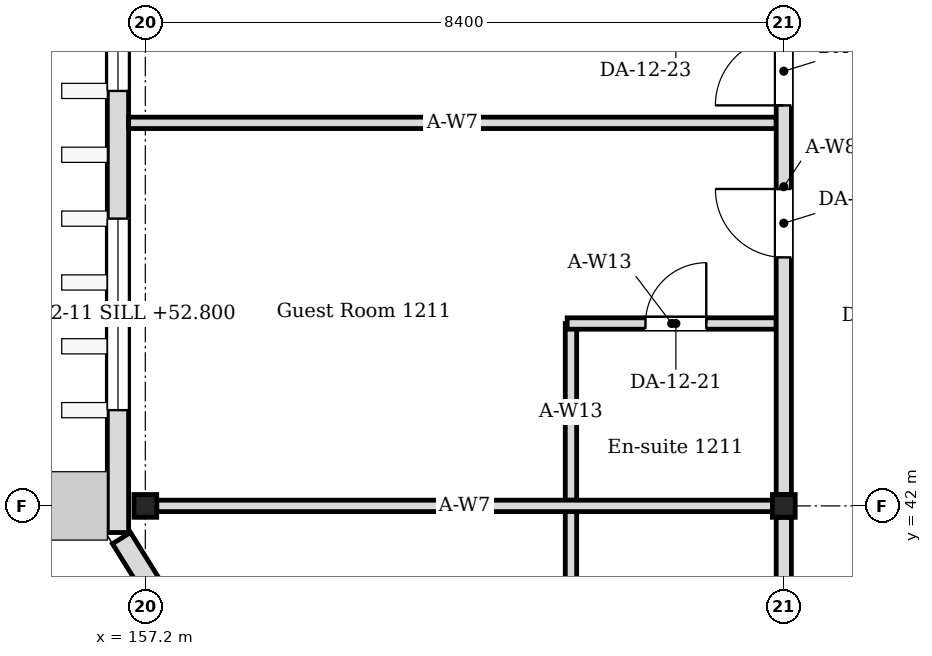
"""IFC4 building model, lengths in metres.
Left out: names, types, materials, properties, quantities, classifications, styles, units other than length and angle.
Written with IfcOpenShell. Run it as: python <this file> out.ifc"""

import sys

from ifc_helpers import new_model, si_unit, direction, frame, frame_2d, origin, origin_2d, place, context, subcontext, project, spatial, rectangle, i_section, extrude, element, fill, save


model = new_model("IFC4")
c1 = context("Model", 3, precision=1e-05, world=origin(), true_north=direction((0.0, 1.0)))
c2 = subcontext(c1, "Body", "Model", "MODEL_VIEW")
j1 = project(units=[si_unit("LENGTHUNIT", "METRE"), si_unit("PLANEANGLEUNIT", "RADIAN")], contexts=[c1])
p1 = place(None, origin())
s1 = spatial("IfcSite", under=j1, at=p1, CompositionType="ELEMENT")
p2 = place(p1, origin())
s2 = spatial("IfcBuilding", under=s1, at=p2, CompositionType="ELEMENT")
p3 = place(p2, frame((0.0, 0.0, 52.2)))
s3 = spatial("IfcBuildingStorey", under=s2, at=p3, CompositionType="ELEMENT", Elevation=52.2)
for number, where, z_axis, x_axis in (
    (1, (157.2, 42.0, 0.0), (0.0, 0.0, 1.0), (1.0, 0.0, 0.0)),
    (2, (165.6, 42.0, 0.0), (0.0, 0.0, 1.0), (1.0, 0.0, 0.0)),
):
    element("IfcColumn", number, at=place(p3, frame(where, z_axis=z_axis, x_axis=x_axis)), inside=s3, PredefinedType="COLUMN", context=c2, shape_type="SweptSolid", body=[
        extrude(i_section(OverallWidth=0.3, OverallDepth=0.3, WebThickness=0.01, FlangeThickness=0.015, FilletRadius=0.013, at=origin_2d()), origin(), (0.0, 0.0, 1.0), 4.2),
    ])
p4 = place(p3, frame((159.079, 38.059, 0.0), z_axis=(0.0, 0.0, 1.0), x_axis=(-0.529018946142, 0.848610013271, 0.0)))
e3 = element("IfcWall", 3, at=p4, inside=s3, PredefinedType="SOLIDWALL", context=c2, shape_type="SweptSolid", body=[
    extrude(rectangle(XDim=4.144, YDim=0.28, at=frame_2d((2.072, 0.0))), origin(), (0.0, 0.0, 1.0), 4.05),
])
p5 = place(p4, frame((0.812, 0.0, 0.6)))
e4 = element("IfcOpeningElement", 4, at=p5, cuts=e3, PredefinedType="OPENING", context=c2, shape_type="SweptSolid", body=[
    extrude(rectangle(XDim=2.52, YDim=2.4, at=frame_2d((1.26, 1.2))), frame((0.0, 0.15, 0.0), z_axis=(0.0, -1.0, 0.0), x_axis=(1.0, 0.0, 0.0)), (0.0, 0.0, 1.0), 0.3),
])
p6 = place(p3, frame((156.84, 41.65, 0.0), z_axis=(0.0, 0.0, 1.0), x_axis=(0.0, 1.0, 0.0)))
e5 = element("IfcWall", 5, at=p6, inside=s3, PredefinedType="SOLIDWALL", context=c2, shape_type="SweptSolid", body=[
    extrude(rectangle(XDim=25.77, YDim=0.28, at=frame_2d((12.885, 0.0))), origin(), (0.0, 0.0, 1.0), 4.05),
])
p7 = place(p6, frame((1.61, 0.0, 0.6)))
e6 = element("IfcOpeningElement", 6, at=p7, cuts=e5, PredefinedType="OPENING", context=c2, shape_type="SweptSolid", body=[
    extrude(rectangle(XDim=2.52, YDim=2.4, at=frame_2d((1.26, 1.2))), frame((0.0, 0.15, 0.0), z_axis=(0.0, -1.0, 0.0), x_axis=(1.0, 0.0, 0.0)), (0.0, 0.0, 1.0), 0.3),
])
p8 = place(p6, frame((5.81, 0.0, 0.6)))
e7 = element("IfcOpeningElement", 7, at=p8, cuts=e5, PredefinedType="OPENING", context=c2, shape_type="SweptSolid", body=[
    extrude(rectangle(XDim=2.52, YDim=2.4, at=frame_2d((1.26, 1.2))), frame((0.0, 0.15, 0.0), z_axis=(0.0, -1.0, 0.0), x_axis=(1.0, 0.0, 0.0)), (0.0, 0.0, 1.0), 0.3),
])
p9 = place(p6, frame((9.59, 0.0, 0.6)))
e8 = element("IfcOpeningElement", 8, at=p9, cuts=e5, PredefinedType="OPENING", context=c2, shape_type="SweptSolid", body=[
    extrude(rectangle(XDim=2.52, YDim=2.4, at=frame_2d((1.26, 1.2))), frame((0.0, 0.15, 0.0), z_axis=(0.0, -1.0, 0.0), x_axis=(1.0, 0.0, 0.0)), (0.0, 0.0, 1.0), 0.3),
])
p10 = place(p6, frame((13.79, 0.0, 0.6)))
e9 = element("IfcOpeningElement", 9, at=p10, cuts=e5, PredefinedType="OPENING", context=c2, shape_type="SweptSolid", body=[
    extrude(rectangle(XDim=2.52, YDim=2.4, at=frame_2d((1.26, 1.2))), frame((0.0, 0.15, 0.0), z_axis=(0.0, -1.0, 0.0), x_axis=(1.0, 0.0, 0.0)), (0.0, 0.0, 1.0), 0.3),
])
p11 = place(p6, frame((18.41, 0.0, 0.6)))
e10 = element("IfcOpeningElement", 10, at=p11, cuts=e5, PredefinedType="OPENING", context=c2, shape_type="SweptSolid", body=[
    extrude(rectangle(XDim=2.52, YDim=2.4, at=frame_2d((1.26, 1.2))), frame((0.0, 0.15, 0.0), z_axis=(0.0, -1.0, 0.0), x_axis=(1.0, 0.0, 0.0)), (0.0, 0.0, 1.0), 0.3),
])
p12 = place(p6, frame((22.61, 0.0, 0.6)))
e11 = element("IfcOpeningElement", 11, at=p12, cuts=e5, PredefinedType="OPENING", context=c2, shape_type="SweptSolid", body=[
    extrude(rectangle(XDim=2.52, YDim=2.4, at=frame_2d((1.26, 1.2))), frame((0.0, 0.15, 0.0), z_axis=(0.0, -1.0, 0.0), x_axis=(1.0, 0.0, 0.0)), (0.0, 0.0, 1.0), 0.3),
])
for number, where, z_axis, x_axis in (
    (12, (162.8, 39.6, 0.0), (0.0, 0.0, 1.0), (0.0, 1.0, 0.0)),
    (13, (162.8, 42.075, 0.0), (0.0, 0.0, 1.0), (0.0, 1.0, 0.0)),
):
    element("IfcWall", number, at=place(p3, frame(where, z_axis=z_axis, x_axis=x_axis)), inside=s3, PredefinedType="PARTITIONING", context=c2, shape_type="SweptSolid", body=[
        extrude(rectangle(XDim=2.325, YDim=0.15, at=frame_2d((1.163, 0.0))), origin(), (0.0, 0.0, 1.0), 4.05),
    ])
p13 = place(p3, frame((162.75, 44.4, 0.0), z_axis=(0.0, 0.0, 1.0), x_axis=(1.0, 0.0, 0.0)))
e14 = element("IfcWall", 14, at=p13, inside=s3, PredefinedType="PARTITIONING", context=c2, shape_type="SweptSolid", body=[
    extrude(rectangle(XDim=2.75, YDim=0.15, at=frame_2d((1.375, 0.0))), origin(), (0.0, 0.0, 1.0), 4.05),
])
p14 = place(p13, frame((1.03, 0.0, 0.0)))
e15 = element("IfcOpeningElement", 15, at=p14, cuts=e14, PredefinedType="OPENING", context=c2, shape_type="SweptSolid", body=[
    extrude(rectangle(XDim=0.8, YDim=2.1, at=frame_2d((0.4, 1.05))), frame((0.0, 0.085, 0.0), z_axis=(0.0, -1.0, 0.0), x_axis=(1.0, 0.0, 0.0)), (0.0, 0.0, 1.0), 0.17),
])
p15 = place(p3, frame((157.35, 42.0, 0.0), z_axis=(0.0, 0.0, 1.0), x_axis=(1.0, 0.0, 0.0)))
e16 = element("IfcWall", 16, at=p15, inside=s3, PredefinedType="PARTITIONING", context=c2, shape_type="SweptSolid", body=[
    extrude(rectangle(XDim=8.1, YDim=0.15, at=frame_2d((4.05, 0.0))), origin(), (0.0, 0.0, 1.0), 3.604),
])
p16 = place(p3, frame((156.98, 47.04, 0.0), z_axis=(0.0, 0.0, 1.0), x_axis=(1.0, 0.0, 0.0)))
e17 = element("IfcWall", 17, at=p16, inside=s3, PredefinedType="PARTITIONING", context=c2, shape_type="SweptSolid", body=[
    extrude(rectangle(XDim=8.52, YDim=0.15, at=frame_2d((4.26, 0.0))), origin(), (0.0, 0.0, 1.0), 3.604),
])
p17 = place(p3, frame((165.6, 33.75, 0.0), z_axis=(0.0, 0.0, 1.0), x_axis=(0.0, 1.0, 0.0)))
e18 = element("IfcWall", 18, at=p17, inside=s3, PredefinedType="PARTITIONING", context=c2, shape_type="SweptSolid", body=[
    extrude(rectangle(XDim=8.1, YDim=0.2, at=frame_2d((4.05, 0.0))), origin(), (0.0, 0.0, 1.0), 3.45),
])
p18 = place(p17, frame((2.7, 0.0, 0.0)))
e19 = element("IfcOpeningElement", 19, at=p18, cuts=e18, PredefinedType="OPENING", context=c2, shape_type="SweptSolid", body=[
    extrude(rectangle(XDim=0.9, YDim=2.1, at=frame_2d((0.45, 1.05))), frame((0.0, 0.11, 0.0), z_axis=(0.0, -1.0, 0.0), x_axis=(1.0, 0.0, 0.0)), (0.0, 0.0, 1.0), 0.22),
])
p19 = place(p17, frame((4.5, 0.0, 0.0)))
e20 = element("IfcOpeningElement", 20, at=p19, cuts=e18, PredefinedType="OPENING", context=c2, shape_type="SweptSolid", body=[
    extrude(rectangle(XDim=0.9, YDim=2.1, at=frame_2d((0.45, 1.05))), frame((0.0, 0.11, 0.0), z_axis=(0.0, -1.0, 0.0), x_axis=(1.0, 0.0, 0.0)), (0.0, 0.0, 1.0), 0.22),
])
p20 = place(p3, frame((165.6, 42.15, 0.0), z_axis=(0.0, 0.0, 1.0), x_axis=(0.0, 1.0, 0.0)))
e21 = element("IfcWall", 21, at=p20, inside=s3, PredefinedType="PARTITIONING", context=c2, shape_type="SweptSolid", body=[
    extrude(rectangle(XDim=8.1, YDim=0.2, at=frame_2d((4.05, 0.0))), origin(), (0.0, 0.0, 1.0), 3.45),
])
p21 = place(p20, frame((3.12, 0.0, 0.0)))
e22 = element("IfcOpeningElement", 22, at=p21, cuts=e21, PredefinedType="OPENING", context=c2, shape_type="SweptSolid", body=[
    extrude(rectangle(XDim=0.9, YDim=2.1, at=frame_2d((0.45, 1.05))), frame((0.0, 0.11, 0.0), z_axis=(0.0, -1.0, 0.0), x_axis=(1.0, 0.0, 0.0)), (0.0, 0.0, 1.0), 0.22),
])
p22 = place(p20, frame((5.12, 0.0, 0.0)))
e23 = element("IfcOpeningElement", 23, at=p22, cuts=e21, PredefinedType="OPENING", context=c2, shape_type="SweptSolid", body=[
    extrude(rectangle(XDim=0.9, YDim=2.1, at=frame_2d((0.45, 1.05))), frame((0.0, 0.11, 0.0), z_axis=(0.0, -1.0, 0.0), x_axis=(1.0, 0.0, 0.0)), (0.0, 0.0, 1.0), 0.22),
])
p23 = place(p7, origin())
e24 = element("IfcWindow", 24, at=p23, inside=s3, PartitioningType="SINGLE_PANEL", PredefinedType="WINDOW", context=c2, shape_type="SweptSolid", body=[
    extrude(rectangle(XDim=2.52, YDim=2.4, at=frame_2d((1.26, 1.2))), frame((0.0, 0.03, 0.0), z_axis=(0.0, -1.0, 0.0), x_axis=(1.0, 0.0, 0.0)), (0.0, 0.0, 1.0), 0.06),
])
fill(e6, e24)
p24 = place(p8, origin())
e25 = element("IfcWindow", 25, at=p24, inside=s3, PartitioningType="SINGLE_PANEL", PredefinedType="WINDOW", context=c2, shape_type="SweptSolid", body=[
    extrude(rectangle(XDim=2.52, YDim=2.4, at=frame_2d((1.26, 1.2))), frame((0.0, 0.03, 0.0), z_axis=(0.0, -1.0, 0.0), x_axis=(1.0, 0.0, 0.0)), (0.0, 0.0, 1.0), 0.06),
])
fill(e7, e25)
p25 = place(p14, origin())
e26 = element("IfcDoor", 26, at=p25, inside=s3, OperationType="SINGLE_SWING_RIGHT", PredefinedType="DOOR", context=c2, shape_type="SweptSolid", body=[
    extrude(rectangle(XDim=0.8, YDim=2.1, at=frame_2d((0.4, 1.05))), frame((0.0, 0.025, 0.0), z_axis=(0.0, -1.0, 0.0), x_axis=(1.0, 0.0, 0.0)), (0.0, 0.0, 1.0), 0.05),
])
fill(e15, e26)
p26 = place(p21, origin())
e27 = element("IfcDoor", 27, at=p26, inside=s3, OperationType="SINGLE_SWING_RIGHT", PredefinedType="DOOR", context=c2, shape_type="SweptSolid", body=[
    extrude(rectangle(XDim=0.9, YDim=2.1, at=frame_2d((0.45, 1.05))), frame((0.0, 0.025, 0.0), z_axis=(0.0, -1.0, 0.0), x_axis=(1.0, 0.0, 0.0)), (0.0, 0.0, 1.0), 0.05),
])
fill(e22, e27)
p27 = place(p22, origin())
e28 = element("IfcDoor", 28, at=p27, inside=s3, OperationType="SINGLE_SWING_LEFT", PredefinedType="DOOR", context=c2, shape_type="SweptSolid", body=[
    extrude(rectangle(XDim=0.9, YDim=2.1, at=frame_2d((0.45, 1.05))), frame((0.0, 0.025, 0.0), z_axis=(0.0, -1.0, 0.0), x_axis=(1.0, 0.0, 0.0)), (0.0, 0.0, 1.0), 0.05),
])
fill(e23, e28)
save(model, sys.argv[1])
